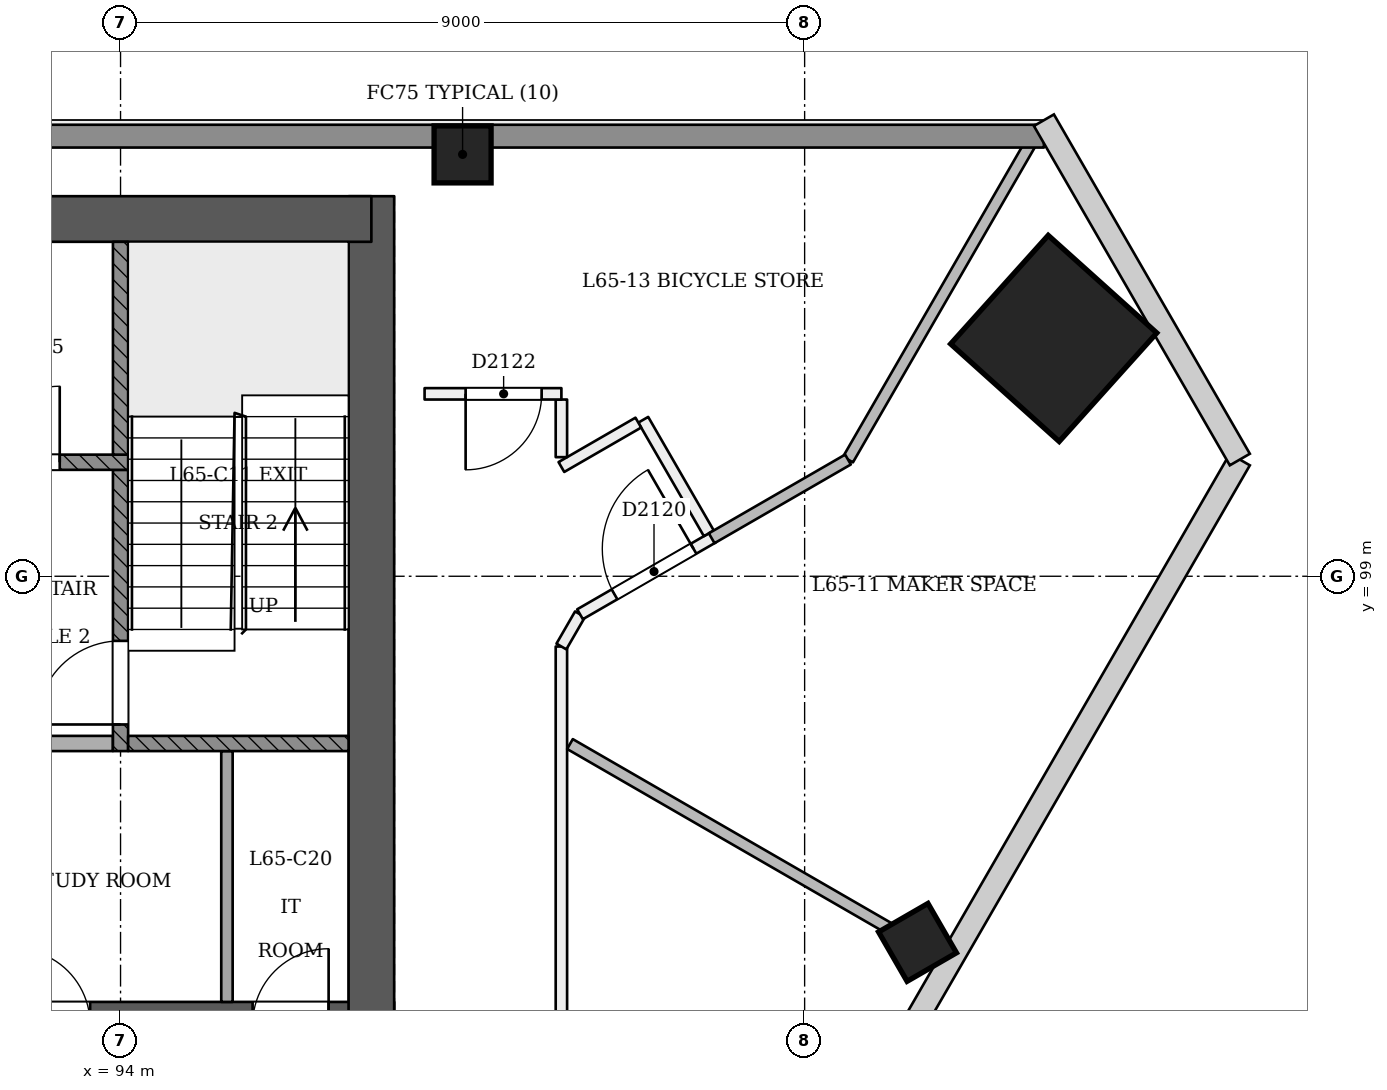
"""IFC4 building model, lengths in metres.
Left out: names, types, materials, properties, quantities, classifications, styles, units other than length and angle.
Written with IfcOpenShell. Run it as: python <this file> out.ifc"""

import sys

from ifc_helpers import new_model, si_unit, direction, frame, frame_2d, origin, origin_2d, place, context, subcontext, project, spatial, rectangle, extrude, element, fill, save


model = new_model("IFC4")
c1 = context("Model", 3, precision=1e-05, world=origin(), true_north=direction((0.0, 1.0)))
c2 = subcontext(c1, "Body", "Model", "MODEL_VIEW")
j1 = project(units=[si_unit("LENGTHUNIT", "METRE"), si_unit("PLANEANGLEUNIT", "RADIAN")], contexts=[c1])
p1 = place(None, origin())
s1 = spatial("IfcSite", under=j1, at=p1, CompositionType="ELEMENT")
p2 = place(p1, origin())
s2 = spatial("IfcBuilding", under=s1, at=p2, CompositionType="ELEMENT")
p3 = place(p2, frame((0.0, 0.0, 253.6)))
s3 = spatial("IfcBuildingStorey", under=s2, at=p3, CompositionType="ELEMENT", Elevation=253.6)
p4 = place(p3, frame((72.7, 93.1, 0.0), z_axis=(0.0, 0.0, 1.0), x_axis=(1.0, 0.0, 0.0)))
e1 = element("IfcWall", 1, at=p4, inside=s3, PredefinedType="SHEAR", context=c2, shape_type="SweptSolid", body=[
    extrude(rectangle(XDim=24.9, YDim=0.6, at=frame_2d((12.45, 0.0))), origin(), (0.0, 0.0, 1.0), 3.6),
])
p5 = place(p4, frame((1.1, 0.0, 0.0)))
e2 = element("IfcOpeningElement", 2, at=p5, cuts=e1, PredefinedType="OPENING", context=c2, shape_type="SweptSolid", body=[
    extrude(rectangle(XDim=1.2, YDim=2.1, at=frame_2d((0.6, 1.05))), frame((0.0, 0.311, 0.0), z_axis=(0.0, -1.0, 0.0), x_axis=(1.0, 0.0, 0.0)), (0.0, 0.0, 1.0), 0.621),
])
p6 = place(p4, frame((3.3, 0.0, 0.0)))
e3 = element("IfcOpeningElement", 3, at=p6, cuts=e1, PredefinedType="OPENING", context=c2, shape_type="SweptSolid", body=[
    extrude(rectangle(XDim=1.2, YDim=2.1, at=frame_2d((0.6, 1.05))), frame((0.0, 0.311, 0.0), z_axis=(0.0, -1.0, 0.0), x_axis=(1.0, 0.0, 0.0)), (0.0, 0.0, 1.0), 0.621),
])
p7 = place(p4, frame((13.3, 0.0, 0.0)))
e4 = element("IfcOpeningElement", 4, at=p7, cuts=e1, PredefinedType="OPENING", context=c2, shape_type="SweptSolid", body=[
    extrude(rectangle(XDim=1.2, YDim=2.1, at=frame_2d((0.6, 1.05))), frame((0.0, 0.311, 0.0), z_axis=(0.0, -1.0, 0.0), x_axis=(1.0, 0.0, 0.0)), (0.0, 0.0, 1.0), 0.621),
])
p8 = place(p4, frame((16.012, 0.0, 0.0)))
e5 = element("IfcOpeningElement", 5, at=p8, cuts=e1, PredefinedType="OPENING", context=c2, shape_type="SweptSolid", body=[
    extrude(rectangle(XDim=1.0, YDim=2.1, at=frame_2d((0.5, 1.05))), frame((0.0, 0.311, 0.0), z_axis=(0.0, -1.0, 0.0), x_axis=(1.0, 0.0, 0.0)), (0.0, 0.0, 1.0), 0.621),
])
p9 = place(p4, frame((19.9, 0.0, 0.0)))
e6 = element("IfcOpeningElement", 6, at=p9, cuts=e1, PredefinedType="OPENING", context=c2, shape_type="SweptSolid", body=[
    extrude(rectangle(XDim=1.0, YDim=2.1, at=frame_2d((0.5, 1.05))), frame((0.0, 0.311, 0.0), z_axis=(0.0, -1.0, 0.0), x_axis=(1.0, 0.0, 0.0)), (0.0, 0.0, 1.0), 0.621),
])
p10 = place(p4, frame((23.038, 0.0, 0.0)))
e7 = element("IfcOpeningElement", 7, at=p10, cuts=e1, PredefinedType="OPENING", context=c2, shape_type="SweptSolid", body=[
    extrude(rectangle(XDim=1.0, YDim=2.1, at=frame_2d((0.5, 1.05))), frame((0.0, 0.311, 0.0), z_axis=(0.0, -1.0, 0.0), x_axis=(1.0, 0.0, 0.0)), (0.0, 0.0, 1.0), 0.621),
])
p11 = place(p3, frame((97.3, 93.1, 0.0), z_axis=(0.0, 0.0, 1.0), x_axis=(0.0, 1.0, 0.0)))
e8 = element("IfcWall", 8, at=p11, inside=s3, PredefinedType="SHEAR", context=c2, shape_type="SweptSolid", body=[
    extrude(rectangle(XDim=10.9, YDim=0.6, at=frame_2d((5.45, 0.0))), origin(), (0.0, 0.0, 1.0), 3.6),
])
p12 = place(p3, frame((97.3, 103.7, 0.0), z_axis=(0.0, 0.0, 1.0), x_axis=(-1.0, 0.0, 0.0)))
e9 = element("IfcWall", 9, at=p12, inside=s3, PredefinedType="SHEAR", context=c2, shape_type="SweptSolid", body=[
    extrude(rectangle(XDim=24.9, YDim=0.6, at=frame_2d((12.45, 0.0))), origin(), (0.0, 0.0, 1.0), 3.6),
])
p13 = place(p3, frame((106.311, 102.118, 0.0), z_axis=(-0.028403721265, 0.009287135593, 0.999553389135), x_axis=(0.498886310803, -0.866382385321, 0.022226364938)))
e10 = element("IfcColumn", 10, at=p13, inside=s3, PredefinedType="COLUMN", context=c2, shape_type="SweptSolid", body=[
    extrude(rectangle(XDim=1.92, YDim=1.92, at=origin_2d()), origin(), (0.0, 0.0, 1.0), 3.602),
])
p14 = place(p3, frame((98.5, 104.55, 0.0), z_axis=(0.0, 0.0, 1.0), x_axis=(1.0, 0.0, 0.0)))
e11 = element("IfcColumn", 11, at=p14, inside=s3, PredefinedType="COLUMN", context=c2, shape_type="SweptSolid", body=[
    extrude(rectangle(XDim=0.75, YDim=0.75, at=origin_2d()), origin(), (0.0, 0.0, 1.0), 3.6),
])
p15 = place(p3, frame((104.512, 94.136, -0.023), z_axis=(-0.022221406801, 0.038413224561, 0.999014831351), x_axis=(-0.499508270339, -0.866024907787, 0.022188892584)))
e12 = element("IfcColumn", 12, at=p15, inside=s3, PredefinedType="COLUMN", context=c2, shape_type="SweptSolid", body=[
    extrude(rectangle(XDim=0.75, YDim=0.75, at=origin_2d()), origin(), (0.0, 0.0, 1.0), 3.604),
])
p16 = place(p3, frame((99.8, 90.6, 0.0), z_axis=(0.0, 0.0, 1.0), x_axis=(0.0, 1.0, 0.0)))
e13 = element("IfcWall", 13, at=p16, inside=s3, PredefinedType="PARTITIONING", context=c2, shape_type="SweptSolid", body=[
    extrude(rectangle(XDim=7.476, YDim=0.15, at=frame_2d((3.738, 0.0))), origin(), (0.0, 0.0, 1.0), 3.2),
])
p17 = place(p16, frame((0.234, 0.0, 0.0)))
e14 = element("IfcOpeningElement", 14, at=p17, cuts=e13, PredefinedType="OPENING", context=c2, shape_type="SweptSolid", body=[
    extrude(rectangle(XDim=1.2, YDim=2.1, at=frame_2d((0.6, 1.05))), frame((0.0, 0.085, 0.0), z_axis=(0.0, -1.0, 0.0), x_axis=(1.0, 0.0, 0.0)), (0.0, 0.0, 1.0), 0.171),
])
p18 = place(p3, frame((99.8, 98.076, 0.0), z_axis=(0.0, 0.0, 1.0), x_axis=(0.499837493736, 0.866119206493, 0.0)))
e15 = element("IfcWall", 15, at=p18, inside=s3, PredefinedType="PARTITIONING", context=c2, shape_type="SweptSolid", body=[
    extrude(rectangle(XDim=0.49, YDim=0.15, at=frame_2d((0.245, 0.0))), origin(), (0.0, 0.0, 1.0), 3.2),
])
p19 = place(p3, frame((100.045, 98.5, 0.0), z_axis=(0.0, 0.0, 1.0), x_axis=(0.866010470582, 0.500025864173, 0.0)))
e16 = element("IfcWall", 16, at=p19, inside=s3, PredefinedType="PARTITIONING", context=c2, shape_type="SweptSolid", body=[
    extrude(rectangle(XDim=2.02, YDim=0.15, at=frame_2d((1.01, 0.0))), origin(), (0.0, 0.0, 1.0), 3.2),
])
p20 = place(p19, frame((0.524, 0.0, 0.0)))
e17 = element("IfcOpeningElement", 17, at=p20, cuts=e16, PredefinedType="OPENING", context=c2, shape_type="SweptSolid", body=[
    extrude(rectangle(XDim=1.2, YDim=2.1, at=frame_2d((0.6, 1.05))), frame((0.0, 0.085, 0.0), z_axis=(0.0, -1.0, 0.0), x_axis=(1.0, 0.0, 0.0)), (0.0, 0.0, 1.0), 0.171),
])
p21 = place(p3, frame((101.74, 99.565, 0.0), z_axis=(0.0, 0.0, 1.0), x_axis=(-0.500020560727, 0.866013532718, 0.0)))
e18 = element("IfcWall", 18, at=p21, inside=s3, PredefinedType="PARTITIONING", context=c2, shape_type="SweptSolid", body=[
    extrude(rectangle(XDim=1.725, YDim=0.15, at=frame_2d((0.863, 0.0))), origin(), (0.0, 0.0, 1.0), 3.2),
])
p22 = place(p3, frame((100.812, 101.021, 0.0), z_axis=(0.0, 0.0, 1.0), x_axis=(-0.86603597662, -0.499981686864, 0.0)))
e19 = element("IfcWall", 19, at=p22, inside=s3, PredefinedType="PARTITIONING", context=c2, shape_type="SweptSolid", body=[
    extrude(rectangle(XDim=1.168, YDim=0.15, at=frame_2d((0.584, 0.0))), origin(), (0.0, 0.0, 1.0), 3.2),
])
p23 = place(p3, frame((99.8, 100.567, 0.0), z_axis=(0.0, 0.0, 1.0), x_axis=(0.0, 1.0, 0.0)))
e20 = element("IfcWall", 20, at=p23, inside=s3, PredefinedType="PARTITIONING", context=c2, shape_type="SweptSolid", body=[
    extrude(rectangle(XDim=0.758, YDim=0.15, at=frame_2d((0.379, 0.0))), origin(), (0.0, 0.0, 1.0), 3.2),
])
p24 = place(p3, frame((99.8, 101.4, 0.0), z_axis=(0.0, 0.0, 1.0), x_axis=(-1.0, 0.0, 0.0)))
e21 = element("IfcWall", 21, at=p24, inside=s3, PredefinedType="PARTITIONING", context=c2, shape_type="SweptSolid", body=[
    extrude(rectangle(XDim=1.8, YDim=0.15, at=frame_2d((0.9, 0.0))), origin(), (0.0, 0.0, 1.0), 3.2),
])
p25 = place(p24, frame((0.26, 0.0, 0.0)))
e22 = element("IfcOpeningElement", 22, at=p25, cuts=e21, PredefinedType="OPENING", context=c2, shape_type="SweptSolid", body=[
    extrude(rectangle(XDim=1.0, YDim=2.1, at=frame_2d((0.5, 1.05))), frame((0.0, 0.085, 0.0), z_axis=(0.0, -1.0, 0.0), x_axis=(1.0, 0.0, 0.0)), (0.0, 0.0, 1.0), 0.171),
])
p26 = place(p3, frame((104.815, 93.962, 0.0), z_axis=(0.0, 0.0, 1.0), x_axis=(-0.866029015679, 0.499993743963, 0.0)))
e23 = element("IfcWall", 23, at=p26, inside=s3, PredefinedType="PARTITIONING", context=c2, shape_type="SweptSolid", body=[
    extrude(rectangle(XDim=5.661, YDim=0.15, at=frame_2d((2.83, 0.0))), origin(), (0.0, 0.0, 1.0), 2.7),
])
p27 = place(p3, frame((106.09, 104.9, 0.0), z_axis=(0.0, 0.0, 1.0), x_axis=(-0.499989435719, -0.866031502989, 0.0)))
e24 = element("IfcWall", 24, at=p27, inside=s3, PredefinedType="PARTITIONING", context=c2, shape_type="SweptSolid", body=[
    extrude(rectangle(XDim=5.04, YDim=0.15, at=frame_2d((2.52, 0.0))), origin(), (0.0, 0.0, 1.0), 2.7),
])
p28 = place(p3, frame((103.571, 100.535, 0.0), z_axis=(0.0, 0.0, 1.0), x_axis=(-0.86603638303, -0.499980982906, 0.0)))
e25 = element("IfcWall", 25, at=p28, inside=s3, PredefinedType="PARTITIONING", context=c2, shape_type="SweptSolid", body=[
    extrude(rectangle(XDim=2.071, YDim=0.15, at=frame_2d((1.035, 0.0))), origin(), (0.0, 0.0, 1.0), 3.2),
])
p29 = place(p3, frame((63.852, 104.79, 0.0), z_axis=(0.0, 0.0, 1.0), x_axis=(1.0, 0.0, 0.0)))
e26 = element("IfcWall", 26, at=p29, inside=s3, PredefinedType="SOLIDWALL", context=c2, shape_type="SweptSolid", body=[
    extrude(rectangle(XDim=42.296, YDim=0.3, at=frame_2d((21.148, 0.0))), origin(), (0.0, 0.0, 1.0), 2.7),
])
p30 = place(p3, frame((95.4, 93.4, 0.0), z_axis=(0.0, 0.0, 1.0), x_axis=(0.0, 1.0, 0.0)))
e27 = element("IfcWall", 27, at=p30, inside=s3, PredefinedType="PARTITIONING", context=c2, shape_type="SweptSolid", body=[
    extrude(rectangle(XDim=3.3, YDim=0.15, at=frame_2d((1.65, 0.0))), origin(), (0.0, 0.0, 1.0), 3.2),
])
p31 = place(p3, frame((91.5, 96.8, 0.0), z_axis=(0.0, 0.0, 1.0), x_axis=(1.0, 0.0, 0.0)))
e28 = element("IfcWall", 28, at=p31, inside=s3, PredefinedType="PARTITIONING", context=c2, shape_type="SweptSolid", body=[
    extrude(rectangle(XDim=2.4, YDim=0.2, at=frame_2d((1.2, 0.0))), origin(), (0.0, 0.0, 1.0), 3.2),
])
p32 = place(p3, frame((94.0, 96.7, 0.0), z_axis=(0.0, 0.0, 1.0), x_axis=(0.0, 1.0, 0.0)))
e29 = element("IfcWall", 29, at=p32, inside=s3, PredefinedType="SOLIDWALL", context=c2, shape_type="SweptSolid", body=[
    extrude(rectangle(XDim=3.7, YDim=0.2, at=frame_2d((1.85, 0.0))), origin(), (0.0, 0.0, 1.0), 3.2),
])
p33 = place(p32, frame((0.35, 0.0, 0.0)))
e30 = element("IfcOpeningElement", 30, at=p33, cuts=e29, PredefinedType="OPENING", context=c2, shape_type="SweptSolid", body=[
    extrude(rectangle(XDim=1.1, YDim=2.1, at=frame_2d((0.55, 1.05))), frame((0.0, 0.11, 0.0), z_axis=(0.0, -1.0, 0.0), x_axis=(1.0, 0.0, 0.0)), (0.0, 0.0, 1.0), 0.221),
])
p34 = place(p3, frame((94.1, 96.8, 0.0), z_axis=(0.0, 0.0, 1.0), x_axis=(1.0, 0.0, 0.0)))
e31 = element("IfcWall", 31, at=p34, inside=s3, PredefinedType="SOLIDWALL", context=c2, shape_type="SweptSolid", body=[
    extrude(rectangle(XDim=2.9, YDim=0.2, at=frame_2d((1.45, 0.0))), origin(), (0.0, 0.0, 1.0), 3.2),
])
p35 = place(p3, frame((75.9, 100.5, 0.0), z_axis=(0.0, 0.0, 1.0), x_axis=(1.0, 0.0, 0.0)))
e32 = element("IfcWall", 32, at=p35, inside=s3, PredefinedType="SOLIDWALL", context=c2, shape_type="SweptSolid", body=[
    extrude(rectangle(XDim=18.2, YDim=0.2, at=frame_2d((9.1, 0.0))), origin(), (0.0, 0.0, 1.0), 3.2),
])
p36 = place(p35, frame((2.6, 0.0, 0.0)))
e33 = element("IfcOpeningElement", 33, at=p36, cuts=e32, PredefinedType="OPENING", context=c2, shape_type="SweptSolid", body=[
    extrude(rectangle(XDim=1.1, YDim=2.1, at=frame_2d((0.55, 1.05))), frame((0.0, 0.11, 0.0), z_axis=(0.0, -1.0, 0.0), x_axis=(1.0, 0.0, 0.0)), (0.0, 0.0, 1.0), 0.221),
])
p37 = place(p35, frame((4.5, 0.0, 0.0)))
e34 = element("IfcOpeningElement", 34, at=p37, cuts=e32, PredefinedType="OPENING", context=c2, shape_type="SweptSolid", body=[
    extrude(rectangle(XDim=1.1, YDim=2.1, at=frame_2d((0.55, 1.05))), frame((0.0, 0.11, 0.0), z_axis=(0.0, -1.0, 0.0), x_axis=(1.0, 0.0, 0.0)), (0.0, 0.0, 1.0), 0.221),
])
p38 = place(p35, frame((6.4, 0.0, 0.0)))
e35 = element("IfcOpeningElement", 35, at=p38, cuts=e32, PredefinedType="OPENING", context=c2, shape_type="SweptSolid", body=[
    extrude(rectangle(XDim=1.1, YDim=2.1, at=frame_2d((0.55, 1.05))), frame((0.0, 0.11, 0.0), z_axis=(0.0, -1.0, 0.0), x_axis=(1.0, 0.0, 0.0)), (0.0, 0.0, 1.0), 0.221),
])
p39 = place(p35, frame((8.3, 0.0, 0.0)))
e36 = element("IfcOpeningElement", 36, at=p39, cuts=e32, PredefinedType="OPENING", context=c2, shape_type="SweptSolid", body=[
    extrude(rectangle(XDim=1.1, YDim=2.1, at=frame_2d((0.55, 1.05))), frame((0.0, 0.11, 0.0), z_axis=(0.0, -1.0, 0.0), x_axis=(1.0, 0.0, 0.0)), (0.0, 0.0, 1.0), 0.221),
])
p40 = place(p35, frame((10.2, 0.0, 0.0)))
e37 = element("IfcOpeningElement", 37, at=p40, cuts=e32, PredefinedType="OPENING", context=c2, shape_type="SweptSolid", body=[
    extrude(rectangle(XDim=1.1, YDim=2.1, at=frame_2d((0.55, 1.05))), frame((0.0, 0.11, 0.0), z_axis=(0.0, -1.0, 0.0), x_axis=(1.0, 0.0, 0.0)), (0.0, 0.0, 1.0), 0.221),
])
p41 = place(p35, frame((12.1, 0.0, 0.0)))
e38 = element("IfcOpeningElement", 38, at=p41, cuts=e32, PredefinedType="OPENING", context=c2, shape_type="SweptSolid", body=[
    extrude(rectangle(XDim=1.1, YDim=2.1, at=frame_2d((0.55, 1.05))), frame((0.0, 0.11, 0.0), z_axis=(0.0, -1.0, 0.0), x_axis=(1.0, 0.0, 0.0)), (0.0, 0.0, 1.0), 0.221),
])
p42 = place(p35, frame((14.0, 0.0, 0.0)))
e39 = element("IfcOpeningElement", 39, at=p42, cuts=e32, PredefinedType="OPENING", context=c2, shape_type="SweptSolid", body=[
    extrude(rectangle(XDim=1.1, YDim=2.1, at=frame_2d((0.55, 1.05))), frame((0.0, 0.11, 0.0), z_axis=(0.0, -1.0, 0.0), x_axis=(1.0, 0.0, 0.0)), (0.0, 0.0, 1.0), 0.221),
])
p43 = place(p35, frame((0.65, 0.0, 0.0)))
e40 = element("IfcOpeningElement", 40, at=p43, cuts=e32, PredefinedType="OPENING", context=c2, shape_type="SweptSolid", body=[
    extrude(rectangle(XDim=1.0, YDim=2.1, at=frame_2d((0.5, 1.05))), frame((0.0, 0.11, 0.0), z_axis=(0.0, -1.0, 0.0), x_axis=(1.0, 0.0, 0.0)), (0.0, 0.0, 1.0), 0.221),
])
p44 = place(p35, frame((16.3, 0.0, 0.0)))
e41 = element("IfcOpeningElement", 41, at=p44, cuts=e32, PredefinedType="OPENING", context=c2, shape_type="SweptSolid", body=[
    extrude(rectangle(XDim=1.0, YDim=2.1, at=frame_2d((0.5, 1.05))), frame((0.0, 0.11, 0.0), z_axis=(0.0, -1.0, 0.0), x_axis=(1.0, 0.0, 0.0)), (0.0, 0.0, 1.0), 0.221),
])
p45 = place(p3, frame((94.0, 100.6, 0.0), z_axis=(0.0, 0.0, 1.0), x_axis=(0.0, 1.0, 0.0)))
e42 = element("IfcWall", 42, at=p45, inside=s3, PredefinedType="SOLIDWALL", context=c2, shape_type="SweptSolid", body=[
    extrude(rectangle(XDim=2.8, YDim=0.2, at=frame_2d((1.4, 0.0))), origin(), (0.0, 0.0, 1.0), 3.2),
])
p46 = place(p20, origin())
e43 = element("IfcDoor", 43, at=p46, inside=s3, OperationType="SINGLE_SWING_RIGHT", PredefinedType="NOTDEFINED", context=c2, shape_type="SweptSolid", body=[
    extrude(rectangle(XDim=1.2, YDim=2.1, at=frame_2d((0.6, 1.05))), frame((0.0, 0.025, 0.0), z_axis=(0.0, -1.0, 0.0), x_axis=(1.0, 0.0, 0.0)), (0.0, 0.0, 1.0), 0.05),
])
fill(e17, e43)
p47 = place(p25, origin())
e44 = element("IfcDoor", 44, at=p47, inside=s3, OperationType="SINGLE_SWING_RIGHT", PredefinedType="NOTDEFINED", context=c2, shape_type="SweptSolid", body=[
    extrude(rectangle(XDim=1.0, YDim=2.1, at=frame_2d((0.5, 1.05))), frame((0.0, 0.025, 0.0), z_axis=(0.0, -1.0, 0.0), x_axis=(1.0, 0.0, 0.0)), (0.0, 0.0, 1.0), 0.05),
])
fill(e22, e44)
p48 = place(p33, origin())
e45 = element("IfcDoor", 45, at=p48, inside=s3, OperationType="SINGLE_SWING_LEFT", PredefinedType="NOTDEFINED", context=c2, shape_type="SweptSolid", body=[
    extrude(rectangle(XDim=1.1, YDim=2.1, at=frame_2d((0.55, 1.05))), frame((0.0, 0.025, 0.0), z_axis=(0.0, -1.0, 0.0), x_axis=(1.0, 0.0, 0.0)), (0.0, 0.0, 1.0), 0.05),
])
fill(e30, e45)
p49 = place(p44, origin())
e46 = element("IfcDoor", 46, at=p49, inside=s3, OperationType="SINGLE_SWING_RIGHT", PredefinedType="NOTDEFINED", context=c2, shape_type="SweptSolid", body=[
    extrude(rectangle(XDim=1.0, YDim=2.1, at=frame_2d((0.5, 1.05))), frame((0.0, 0.025, 0.0), z_axis=(0.0, -1.0, 0.0), x_axis=(1.0, 0.0, 0.0)), (0.0, 0.0, 1.0), 0.05),
])
fill(e41, e46)
save(model, sys.argv[1])
